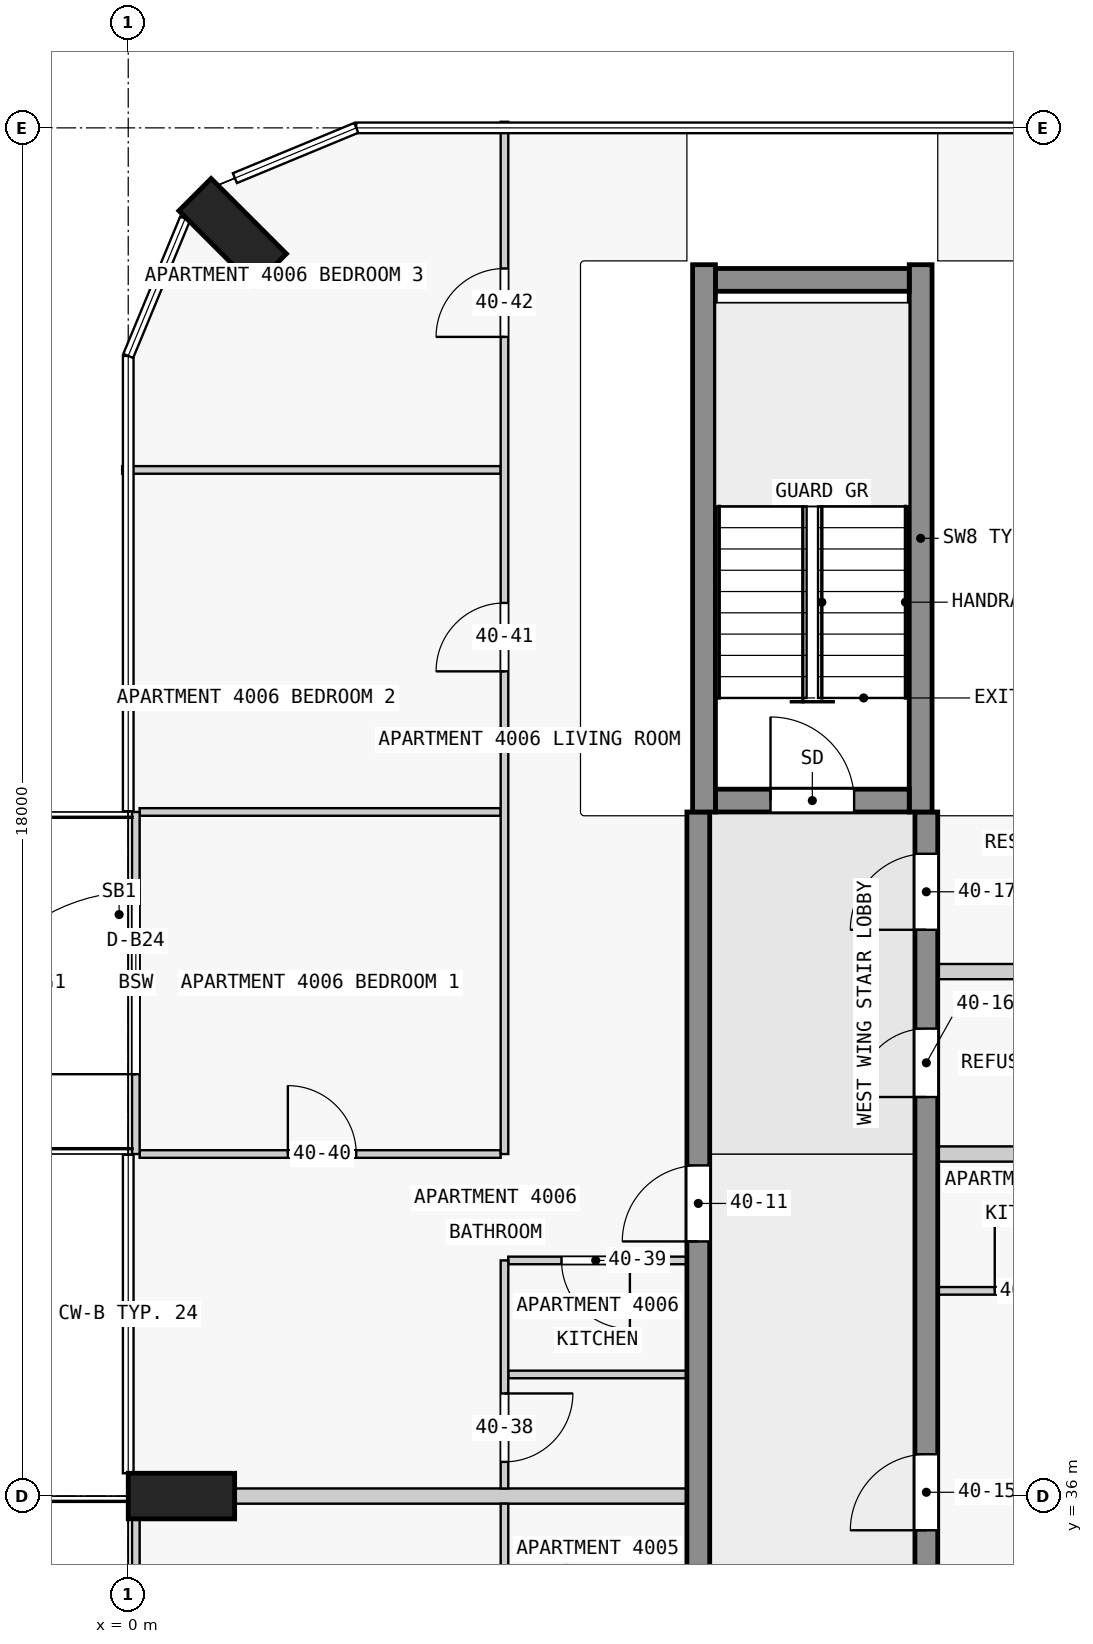
"""IFC4 building model, lengths in metres.
Left out: names, types, materials, properties, quantities, classifications, styles, units other than length and angle.
Written with IfcOpenShell. Run it as: python <this file> out.ifc"""

import sys

from ifc_helpers import new_model, si_unit, direction, frame, frame_2d, origin, origin_2d, place, context, subcontext, project, spatial, rectangle, extrude, element, fill, save


model = new_model("IFC4")
c1 = context("Model", 3, precision=1e-05, world=origin(), true_north=direction((0.0, 1.0)))
c2 = subcontext(c1, "Body", "Model", "MODEL_VIEW")
j1 = project(units=[si_unit("LENGTHUNIT", "METRE"), si_unit("PLANEANGLEUNIT", "RADIAN")], contexts=[c1])
p1 = place(None, origin())
s1 = spatial("IfcSite", under=j1, at=p1, CompositionType="ELEMENT")
p2 = place(p1, origin())
s2 = spatial("IfcBuilding", under=s1, at=p2, CompositionType="ELEMENT")
p3 = place(p2, frame((0.0, 0.0, 156.9)))
s3 = spatial("IfcBuildingStorey", under=s2, at=p3, CompositionType="ELEMENT", Elevation=156.9)
for number, where, z_axis, x_axis in (
    (1, (1.374, 52.626, 0.0), (0.0, 0.0, 1.0), (0.707, 0.707, 0.0)),
    (2, (0.7, 36.0, 0.0), (0.0, 0.0, 1.0), (0.0, 1.0, 0.0)),
):
    element("IfcColumn", number, at=place(p3, frame(where, z_axis=z_axis, x_axis=x_axis)), inside=s3, PredefinedType="COLUMN", context=c2, shape_type="SweptSolid", body=[
        extrude(rectangle(XDim=0.6, YDim=1.4, at=origin_2d()), origin(), (0.0, 0.0, 1.0), 3.5),
    ])
p4 = place(p3, frame((7.725, 45.15, 0.0), z_axis=(0.0, 0.0, 1.0), x_axis=(1.0, 0.0, 0.0)))
e3 = element("IfcWall", 3, at=p4, inside=s3, PredefinedType="SHEAR", context=c2, shape_type="SweptSolid", body=[
    extrude(rectangle(XDim=2.55, YDim=0.3, at=frame_2d((1.275, 0.0))), origin(), (0.0, 0.0, 1.0), 3.5),
])
p5 = place(p4, frame((0.725, 0.0, 0.0)))
e4 = element("IfcOpeningElement", 4, at=p5, cuts=e3, PredefinedType="OPENING", context=c2, shape_type="SweptSolid", body=[
    extrude(rectangle(XDim=1.1, YDim=2.1, at=frame_2d((0.55, 1.05))), frame((0.0, 0.16, 0.0), z_axis=(0.0, -1.0, 0.0), x_axis=(1.0, 0.0, 0.0)), (0.0, 0.0, 1.0), 0.32),
])
p6 = place(p3, frame((7.725, 52.0, 0.0), z_axis=(0.0, 0.0, 1.0), x_axis=(1.0, 0.0, 0.0)))
e5 = element("IfcWall", 5, at=p6, inside=s3, PredefinedType="SHEAR", context=c2, shape_type="SweptSolid", body=[
    extrude(rectangle(XDim=2.55, YDim=0.3, at=frame_2d((1.275, 0.0))), origin(), (0.0, 0.0, 1.0), 3.5),
])
for number, where, z_axis, x_axis in (
    (6, (7.575, 45.0, 0.0), (0.0, 0.0, 1.0), (0.0, 1.0, 0.0)),
    (7, (10.425, 45.0, 0.0), (0.0, 0.0, 1.0), (0.0, 1.0, 0.0)),
):
    element("IfcWall", number, at=place(p3, frame(where, z_axis=z_axis, x_axis=x_axis)), inside=s3, PredefinedType="SHEAR", context=c2, shape_type="SweptSolid", body=[
        extrude(rectangle(XDim=7.2, YDim=0.3, at=frame_2d((3.6, 0.0))), origin(), (0.0, 0.0, 1.0), 3.5),
    ])
p7 = place(p3, frame((7.5, 18.0, 0.0), z_axis=(0.0, 0.0, 1.0), x_axis=(0.0, 1.0, 0.0)))
e8 = element("IfcWall", 8, at=p7, inside=s3, PredefinedType="SHEAR", context=c2, shape_type="SweptSolid", body=[
    extrude(rectangle(XDim=27.0, YDim=0.3, at=frame_2d((13.5, 0.0))), origin(), (0.0, 0.0, 1.0), 3.25),
])
p8 = place(p7, frame((1.75, 0.0, 0.0)))
e9 = element("IfcOpeningElement", 9, at=p8, cuts=e8, PredefinedType="OPENING", context=c2, shape_type="SweptSolid", body=[
    extrude(rectangle(XDim=1.0, YDim=2.1, at=frame_2d((0.5, 1.05))), frame((0.0, 0.16, 0.0), z_axis=(0.0, -1.0, 0.0), x_axis=(1.0, 0.0, 0.0)), (0.0, 0.0, 1.0), 0.32),
])
p9 = place(p7, frame((5.85, 0.0, 0.0)))
e10 = element("IfcOpeningElement", 10, at=p9, cuts=e8, PredefinedType="OPENING", context=c2, shape_type="SweptSolid", body=[
    extrude(rectangle(XDim=1.8, YDim=2.1, at=frame_2d((0.9, 1.05))), frame((0.0, 0.16, 0.0), z_axis=(0.0, -1.0, 0.0), x_axis=(1.0, 0.0, 0.0)), (0.0, 0.0, 1.0), 0.32),
])
p10 = place(p7, frame((13.05, 0.0, 0.0)))
e11 = element("IfcOpeningElement", 11, at=p10, cuts=e8, PredefinedType="OPENING", context=c2, shape_type="SweptSolid", body=[
    extrude(rectangle(XDim=1.0, YDim=2.1, at=frame_2d((0.5, 1.05))), frame((0.0, 0.16, 0.0), z_axis=(0.0, -1.0, 0.0), x_axis=(1.0, 0.0, 0.0)), (0.0, 0.0, 1.0), 0.32),
])
p11 = place(p7, frame((21.35, 0.0, 0.0)))
e12 = element("IfcOpeningElement", 12, at=p11, cuts=e8, PredefinedType="OPENING", context=c2, shape_type="SweptSolid", body=[
    extrude(rectangle(XDim=1.0, YDim=2.1, at=frame_2d((0.5, 1.05))), frame((0.0, 0.16, 0.0), z_axis=(0.0, -1.0, 0.0), x_axis=(1.0, 0.0, 0.0)), (0.0, 0.0, 1.0), 0.32),
])
p12 = place(p3, frame((10.5, 18.0, 0.0), z_axis=(0.0, 0.0, 1.0), x_axis=(0.0, 1.0, 0.0)))
e13 = element("IfcWall", 13, at=p12, inside=s3, PredefinedType="SHEAR", context=c2, shape_type="SweptSolid", body=[
    extrude(rectangle(XDim=27.0, YDim=0.3, at=frame_2d((13.5, 0.0))), origin(), (0.0, 0.0, 1.0), 3.25),
])
p13 = place(p12, frame((1.85, 0.0, 0.0)))
e14 = element("IfcOpeningElement", 14, at=p13, cuts=e13, PredefinedType="OPENING", context=c2, shape_type="SweptSolid", body=[
    extrude(rectangle(XDim=0.9, YDim=2.1, at=frame_2d((0.45, 1.05))), frame((0.0, 0.16, 0.0), z_axis=(0.0, -1.0, 0.0), x_axis=(1.0, 0.0, 0.0)), (0.0, 0.0, 1.0), 0.32),
])
p14 = place(p12, frame((6.25, 0.0, 0.0)))
e15 = element("IfcOpeningElement", 15, at=p14, cuts=e13, PredefinedType="OPENING", context=c2, shape_type="SweptSolid", body=[
    extrude(rectangle(XDim=1.0, YDim=2.1, at=frame_2d((0.5, 1.05))), frame((0.0, 0.16, 0.0), z_axis=(0.0, -1.0, 0.0), x_axis=(1.0, 0.0, 0.0)), (0.0, 0.0, 1.0), 0.32),
])
p15 = place(p12, frame((10.85, 0.0, 0.0)))
e16 = element("IfcOpeningElement", 16, at=p15, cuts=e13, PredefinedType="OPENING", context=c2, shape_type="SweptSolid", body=[
    extrude(rectangle(XDim=0.9, YDim=2.1, at=frame_2d((0.45, 1.05))), frame((0.0, 0.16, 0.0), z_axis=(0.0, -1.0, 0.0), x_axis=(1.0, 0.0, 0.0)), (0.0, 0.0, 1.0), 0.32),
])
p16 = place(p12, frame((17.55, 0.0, 0.0)))
e17 = element("IfcOpeningElement", 17, at=p16, cuts=e13, PredefinedType="OPENING", context=c2, shape_type="SweptSolid", body=[
    extrude(rectangle(XDim=1.0, YDim=2.1, at=frame_2d((0.5, 1.05))), frame((0.0, 0.16, 0.0), z_axis=(0.0, -1.0, 0.0), x_axis=(1.0, 0.0, 0.0)), (0.0, 0.0, 1.0), 0.32),
])
p17 = place(p12, frame((23.25, 0.0, 0.0)))
e18 = element("IfcOpeningElement", 18, at=p17, cuts=e13, PredefinedType="OPENING", context=c2, shape_type="SweptSolid", body=[
    extrude(rectangle(XDim=0.9, YDim=2.1, at=frame_2d((0.45, 1.05))), frame((0.0, 0.16, 0.0), z_axis=(0.0, -1.0, 0.0), x_axis=(1.0, 0.0, 0.0)), (0.0, 0.0, 1.0), 0.32),
])
p18 = place(p12, frame((25.45, 0.0, 0.0)))
e19 = element("IfcOpeningElement", 19, at=p18, cuts=e13, PredefinedType="OPENING", context=c2, shape_type="SweptSolid", body=[
    extrude(rectangle(XDim=1.0, YDim=2.1, at=frame_2d((0.5, 1.05))), frame((0.0, 0.16, 0.0), z_axis=(0.0, -1.0, 0.0), x_axis=(1.0, 0.0, 0.0)), (0.0, 0.0, 1.0), 0.32),
])
p19 = place(p3, frame((0.1, 31.5, 0.0), z_axis=(0.0, 0.0, 1.0), x_axis=(0.0, 1.0, 0.0)))
e20 = element("IfcWall", 20, at=p19, inside=s3, PredefinedType="STANDARD", context=c2, shape_type="SweptSolid", body=[
    extrude(rectangle(XDim=4.5, YDim=0.1, at=frame_2d((2.25, 0.0))), origin(), (0.0, 0.0, 1.0), 3.25),
])
p20 = place(p19, frame((1.05, 0.0, 0.0)))
e21 = element("IfcOpeningElement", 21, at=p20, cuts=e20, PredefinedType="OPENING", context=c2, shape_type="SweptSolid", body=[
    extrude(rectangle(XDim=2.4, YDim=2.4, at=frame_2d((1.2, 1.2))), frame((0.0, 0.06, 0.0), z_axis=(0.0, -1.0, 0.0), x_axis=(1.0, 0.0, 0.0)), (0.0, 0.0, 1.0), 0.12),
])
p21 = place(p3, frame((0.1, 40.5, 0.0), z_axis=(0.0, 0.0, 1.0), x_axis=(0.0, 1.0, 0.0)))
e22 = element("IfcWall", 22, at=p21, inside=s3, PredefinedType="STANDARD", context=c2, shape_type="SweptSolid", body=[
    extrude(rectangle(XDim=4.5, YDim=0.1, at=frame_2d((2.25, 0.0))), origin(), (0.0, 0.0, 1.0), 3.25),
])
p22 = place(p21, frame((1.05, 0.0, 0.0)))
e23 = element("IfcOpeningElement", 23, at=p22, cuts=e22, PredefinedType="OPENING", context=c2, shape_type="SweptSolid", body=[
    extrude(rectangle(XDim=2.4, YDim=2.4, at=frame_2d((1.2, 1.2))), frame((0.0, 0.06, 0.0), z_axis=(0.0, -1.0, 0.0), x_axis=(1.0, 0.0, 0.0)), (0.0, 0.0, 1.0), 0.12),
])
p23 = place(p3, frame((7.35, 36.0, 0.0), z_axis=(0.0, 0.0, 1.0), x_axis=(-1.0, 0.0, 0.0)))
e24 = element("IfcWall", 24, at=p23, inside=s3, PredefinedType="PARTITIONING", context=c2, shape_type="SweptSolid", body=[
    extrude(rectangle(XDim=5.95, YDim=0.2, at=frame_2d((2.975, 0.0))), origin(), (0.0, 0.0, 1.0), 3.25),
])
p24 = place(p3, frame((7.35, 37.6, 0.0), z_axis=(0.0, 0.0, 1.0), x_axis=(-1.0, 0.0, 0.0)))
e25 = element("IfcWall", 25, at=p24, inside=s3, PredefinedType="PARTITIONING", context=c2, shape_type="SweptSolid", body=[
    extrude(rectangle(XDim=2.35, YDim=0.1, at=frame_2d((1.175, 0.0))), origin(), (0.0, 0.0, 1.0), 3.25),
])
p25 = place(p3, frame((10.65, 38.7, 0.0), z_axis=(0.0, 0.0, 1.0), x_axis=(1.0, 0.0, 0.0)))
e26 = element("IfcWall", 26, at=p25, inside=s3, PredefinedType="PARTITIONING", context=c2, shape_type="SweptSolid", body=[
    extrude(rectangle(XDim=2.4, YDim=0.1, at=frame_2d((1.2, 0.0))), origin(), (0.0, 0.0, 1.0), 3.25),
])
p26 = place(p25, frame((0.75, 0.0, 0.0)))
e27 = element("IfcOpeningElement", 27, at=p26, cuts=e26, PredefinedType="OPENING", context=c2, shape_type="SweptSolid", body=[
    extrude(rectangle(XDim=0.9, YDim=2.1, at=frame_2d((0.45, 1.05))), frame((0.0, 0.06, 0.0), z_axis=(0.0, -1.0, 0.0), x_axis=(1.0, 0.0, 0.0)), (0.0, 0.0, 1.0), 0.12),
])
p27 = place(p3, frame((7.35, 39.1, 0.0), z_axis=(0.0, 0.0, 1.0), x_axis=(-1.0, 0.0, 0.0)))
e28 = element("IfcWall", 28, at=p27, inside=s3, PredefinedType="PARTITIONING", context=c2, shape_type="SweptSolid", body=[
    extrude(rectangle(XDim=2.35, YDim=0.1, at=frame_2d((1.175, 0.0))), origin(), (0.0, 0.0, 1.0), 3.25),
])
p28 = place(p27, frame((0.75, 0.0, 0.0)))
e29 = element("IfcOpeningElement", 29, at=p28, cuts=e28, PredefinedType="OPENING", context=c2, shape_type="SweptSolid", body=[
    extrude(rectangle(XDim=0.9, YDim=2.1, at=frame_2d((0.45, 1.05))), frame((0.0, 0.06, 0.0), z_axis=(0.0, -1.0, 0.0), x_axis=(1.0, 0.0, 0.0)), (0.0, 0.0, 1.0), 0.12),
])
p29 = place(p3, frame((0.15, 40.5, 0.0), z_axis=(0.0, 0.0, 1.0), x_axis=(1.0, 0.0, 0.0)))
e30 = element("IfcWall", 30, at=p29, inside=s3, PredefinedType="PARTITIONING", context=c2, shape_type="SweptSolid", body=[
    extrude(rectangle(XDim=4.75, YDim=0.1, at=frame_2d((2.375, 0.0))), origin(), (0.0, 0.0, 1.0), 3.25),
])
p30 = place(p29, frame((1.95, 0.0, 0.0)))
e31 = element("IfcOpeningElement", 31, at=p30, cuts=e30, PredefinedType="OPENING", context=c2, shape_type="SweptSolid", body=[
    extrude(rectangle(XDim=0.9, YDim=2.1, at=frame_2d((0.45, 1.05))), frame((0.0, 0.06, 0.0), z_axis=(0.0, -1.0, 0.0), x_axis=(1.0, 0.0, 0.0)), (0.0, 0.0, 1.0), 0.12),
])
p31 = place(p3, frame((12.95, 40.5, 0.0), z_axis=(0.0, 0.0, 1.0), x_axis=(-1.0, 0.0, 0.0)))
e32 = element("IfcWall", 32, at=p31, inside=s3, PredefinedType="PARTITIONING", context=c2, shape_type="SweptSolid", body=[
    extrude(rectangle(XDim=2.3, YDim=0.2, at=frame_2d((1.15, 0.0))), origin(), (0.0, 0.0, 1.0), 3.25),
])
p32 = place(p3, frame((13.05, 42.9, 0.0), z_axis=(0.0, 0.0, 1.0), x_axis=(-1.0, 0.0, 0.0)))
e33 = element("IfcWall", 33, at=p32, inside=s3, PredefinedType="PARTITIONING", context=c2, shape_type="SweptSolid", body=[
    extrude(rectangle(XDim=2.4, YDim=0.2, at=frame_2d((1.2, 0.0))), origin(), (0.0, 0.0, 1.0), 3.25),
])
p33 = place(p3, frame((4.9, 45.0, 0.0), z_axis=(0.0, 0.0, 1.0), x_axis=(-1.0, 0.0, 0.0)))
e34 = element("IfcWall", 34, at=p33, inside=s3, PredefinedType="PARTITIONING", context=c2, shape_type="SweptSolid", body=[
    extrude(rectangle(XDim=4.75, YDim=0.1, at=frame_2d((2.375, 0.0))), origin(), (0.0, 0.0, 1.0), 3.25),
])
p34 = place(p3, frame((4.9, 49.5, 0.0), z_axis=(0.0, 0.0, 1.0), x_axis=(-1.0, 0.0, 0.0)))
e35 = element("IfcWall", 35, at=p34, inside=s3, PredefinedType="PARTITIONING", context=c2, shape_type="SweptSolid", body=[
    extrude(rectangle(XDim=4.98, YDim=0.1, at=frame_2d((2.49, 0.0))), origin(), (0.0, 0.0, 1.0), 3.25),
])
p35 = place(p3, frame((4.95, 35.9, 0.0), z_axis=(0.0, 0.0, 1.0), x_axis=(0.0, -1.0, 0.0)))
e36 = element("IfcWall", 36, at=p35, inside=s3, PredefinedType="PARTITIONING", context=c2, shape_type="SweptSolid", body=[
    extrude(rectangle(XDim=1.7, YDim=0.1, at=frame_2d((0.85, 0.0))), origin(), (0.0, 0.0, 1.0), 3.25),
])
p36 = place(p3, frame((4.95, 39.1, 0.0), z_axis=(0.0, 0.0, 1.0), x_axis=(0.0, -1.0, 0.0)))
e37 = element("IfcWall", 37, at=p36, inside=s3, PredefinedType="PARTITIONING", context=c2, shape_type="SweptSolid", body=[
    extrude(rectangle(XDim=3.0, YDim=0.1, at=frame_2d((1.5, 0.0))), origin(), (0.0, 0.0, 1.0), 3.25),
])
p37 = place(p36, frame((1.75, 0.0, 0.0)))
e38 = element("IfcOpeningElement", 38, at=p37, cuts=e37, PredefinedType="OPENING", context=c2, shape_type="SweptSolid", body=[
    extrude(rectangle(XDim=0.9, YDim=2.1, at=frame_2d((0.45, 1.05))), frame((0.0, 0.06, 0.0), z_axis=(0.0, -1.0, 0.0), x_axis=(1.0, 0.0, 0.0)), (0.0, 0.0, 1.0), 0.12),
])
p38 = place(p3, frame((4.95, 40.5, 0.0), z_axis=(0.0, 0.0, 1.0), x_axis=(0.0, 1.0, 0.0)))
e39 = element("IfcWall", 39, at=p38, inside=s3, PredefinedType="PARTITIONING", context=c2, shape_type="SweptSolid", body=[
    extrude(rectangle(XDim=13.58, YDim=0.1, at=frame_2d((6.79, 0.0))), origin(), (0.0, 0.0, 1.0), 3.25),
])
p39 = place(p38, frame((6.35, 0.0, 0.0)))
e40 = element("IfcOpeningElement", 40, at=p39, cuts=e39, PredefinedType="OPENING", context=c2, shape_type="SweptSolid", body=[
    extrude(rectangle(XDim=0.9, YDim=2.1, at=frame_2d((0.45, 1.05))), frame((0.0, 0.06, 0.0), z_axis=(0.0, -1.0, 0.0), x_axis=(1.0, 0.0, 0.0)), (0.0, 0.0, 1.0), 0.12),
])
p40 = place(p38, frame((10.75, 0.0, 0.0)))
e41 = element("IfcOpeningElement", 41, at=p40, cuts=e39, PredefinedType="OPENING", context=c2, shape_type="SweptSolid", body=[
    extrude(rectangle(XDim=0.9, YDim=2.1, at=frame_2d((0.45, 1.05))), frame((0.0, 0.06, 0.0), z_axis=(0.0, -1.0, 0.0), x_axis=(1.0, 0.0, 0.0)), (0.0, 0.0, 1.0), 0.12),
])
p41 = place(p22, origin())
e42 = element("IfcDoor", 42, at=p41, inside=s3, OperationType="SINGLE_SWING_LEFT", PredefinedType="DOOR", context=c2, shape_type="SweptSolid", body=[
    extrude(rectangle(XDim=2.4, YDim=2.4, at=frame_2d((1.2, 1.2))), frame((0.0, 0.025, 0.0), z_axis=(0.0, -1.0, 0.0), x_axis=(1.0, 0.0, 0.0)), (0.0, 0.0, 1.0), 0.05),
])
fill(e23, e42)
p42 = place(p5, origin())
e43 = element("IfcDoor", 43, at=p42, inside=s3, OperationType="SINGLE_SWING_LEFT", PredefinedType="DOOR", context=c2, shape_type="SweptSolid", body=[
    extrude(rectangle(XDim=1.1, YDim=2.1, at=frame_2d((0.55, 1.05))), frame((0.0, 0.025, 0.0), z_axis=(0.0, -1.0, 0.0), x_axis=(1.0, 0.0, 0.0)), (0.0, 0.0, 1.0), 0.05),
])
fill(e4, e43)
p43 = place(p11, origin())
e44 = element("IfcDoor", 44, at=p43, inside=s3, OperationType="SINGLE_SWING_RIGHT", PredefinedType="DOOR", context=c2, shape_type="SweptSolid", body=[
    extrude(rectangle(XDim=1.0, YDim=2.1, at=frame_2d((0.5, 1.05))), frame((0.0, 0.025, 0.0), z_axis=(0.0, -1.0, 0.0), x_axis=(1.0, 0.0, 0.0)), (0.0, 0.0, 1.0), 0.05),
])
fill(e12, e44)
p44 = place(p16, origin())
e45 = element("IfcDoor", 45, at=p44, inside=s3, OperationType="SINGLE_SWING_RIGHT", PredefinedType="DOOR", context=c2, shape_type="SweptSolid", body=[
    extrude(rectangle(XDim=1.0, YDim=2.1, at=frame_2d((0.5, 1.05))), frame((0.0, 0.025, 0.0), z_axis=(0.0, -1.0, 0.0), x_axis=(1.0, 0.0, 0.0)), (0.0, 0.0, 1.0), 0.05),
])
fill(e17, e45)
p45 = place(p17, origin())
e46 = element("IfcDoor", 46, at=p45, inside=s3, OperationType="SINGLE_SWING_RIGHT", PredefinedType="DOOR", context=c2, shape_type="SweptSolid", body=[
    extrude(rectangle(XDim=0.9, YDim=2.1, at=frame_2d((0.45, 1.05))), frame((0.0, 0.025, 0.0), z_axis=(0.0, -1.0, 0.0), x_axis=(1.0, 0.0, 0.0)), (0.0, 0.0, 1.0), 0.05),
])
fill(e18, e46)
p46 = place(p18, origin())
e47 = element("IfcDoor", 47, at=p46, inside=s3, OperationType="SINGLE_SWING_RIGHT", PredefinedType="DOOR", context=c2, shape_type="SweptSolid", body=[
    extrude(rectangle(XDim=1.0, YDim=2.1, at=frame_2d((0.5, 1.05))), frame((0.0, 0.025, 0.0), z_axis=(0.0, -1.0, 0.0), x_axis=(1.0, 0.0, 0.0)), (0.0, 0.0, 1.0), 0.05),
])
fill(e19, e47)
p47 = place(p37, origin())
e48 = element("IfcDoor", 48, at=p47, inside=s3, OperationType="SINGLE_SWING_RIGHT", PredefinedType="DOOR", context=c2, shape_type="SweptSolid", body=[
    extrude(rectangle(XDim=0.9, YDim=2.1, at=frame_2d((0.45, 1.05))), frame((0.0, 0.025, 0.0), z_axis=(0.0, -1.0, 0.0), x_axis=(1.0, 0.0, 0.0)), (0.0, 0.0, 1.0), 0.05),
])
fill(e38, e48)
p48 = place(p28, origin())
e49 = element("IfcDoor", 49, at=p48, inside=s3, OperationType="SINGLE_SWING_RIGHT", PredefinedType="DOOR", context=c2, shape_type="SweptSolid", body=[
    extrude(rectangle(XDim=0.9, YDim=2.1, at=frame_2d((0.45, 1.05))), frame((0.0, 0.025, 0.0), z_axis=(0.0, -1.0, 0.0), x_axis=(1.0, 0.0, 0.0)), (0.0, 0.0, 1.0), 0.05),
])
fill(e29, e49)
p49 = place(p30, origin())
e50 = element("IfcDoor", 50, at=p49, inside=s3, OperationType="SINGLE_SWING_RIGHT", PredefinedType="DOOR", context=c2, shape_type="SweptSolid", body=[
    extrude(rectangle(XDim=0.9, YDim=2.1, at=frame_2d((0.45, 1.05))), frame((0.0, 0.025, 0.0), z_axis=(0.0, -1.0, 0.0), x_axis=(1.0, 0.0, 0.0)), (0.0, 0.0, 1.0), 0.05),
])
fill(e31, e50)
p50 = place(p39, origin())
e51 = element("IfcDoor", 51, at=p50, inside=s3, OperationType="SINGLE_SWING_RIGHT", PredefinedType="DOOR", context=c2, shape_type="SweptSolid", body=[
    extrude(rectangle(XDim=0.9, YDim=2.1, at=frame_2d((0.45, 1.05))), frame((0.0, 0.025, 0.0), z_axis=(0.0, -1.0, 0.0), x_axis=(1.0, 0.0, 0.0)), (0.0, 0.0, 1.0), 0.05),
])
fill(e40, e51)
p51 = place(p40, origin())
e52 = element("IfcDoor", 52, at=p51, inside=s3, OperationType="SINGLE_SWING_RIGHT", PredefinedType="DOOR", context=c2, shape_type="SweptSolid", body=[
    extrude(rectangle(XDim=0.9, YDim=2.1, at=frame_2d((0.45, 1.05))), frame((0.0, 0.025, 0.0), z_axis=(0.0, -1.0, 0.0), x_axis=(1.0, 0.0, 0.0)), (0.0, 0.0, 1.0), 0.05),
])
fill(e41, e52)
p52 = place(p26, origin())
e53 = element("IfcDoor", 53, at=p52, inside=s3, OperationType="SINGLE_SWING_LEFT", PredefinedType="DOOR", context=c2, shape_type="SweptSolid", body=[
    extrude(rectangle(XDim=0.9, YDim=2.1, at=frame_2d((0.45, 1.05))), frame((0.0, 0.025, 0.0), z_axis=(0.0, -1.0, 0.0), x_axis=(1.0, 0.0, 0.0)), (0.0, 0.0, 1.0), 0.05),
])
fill(e27, e53)
save(model, sys.argv[1])
